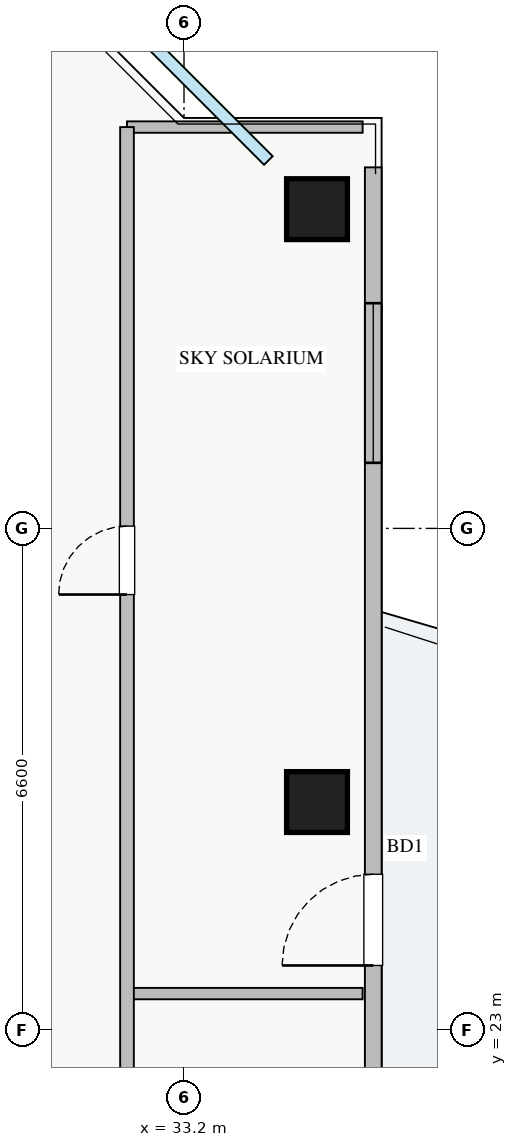
"""IFC4 building model, lengths in metres.
Left out: names, types, materials, properties, quantities, classifications, styles, units other than length and angle.
Written with IfcOpenShell. Run it as: python <this file> out.ifc"""

import sys

from ifc_helpers import new_model, si_unit, direction, frame, frame_2d, origin, origin_2d, place, context, subcontext, project, spatial, rectangle, extrude, source, transform, mapped, element, fill, save


model = new_model("IFC4")
c1 = context("Model", 3, precision=1e-05, world=origin(), true_north=direction((0.0, 1.0)))
c2 = subcontext(c1, "Body", "Model", "MODEL_VIEW")
j1 = project(units=[si_unit("LENGTHUNIT", "METRE"), si_unit("PLANEANGLEUNIT", "RADIAN")], contexts=[c1])
p1 = place(None, origin())
s1 = spatial("IfcSite", under=j1, at=p1, CompositionType="ELEMENT")
p2 = place(p1, origin())
s2 = spatial("IfcBuilding", under=s1, at=p2, CompositionType="ELEMENT")
p3 = place(p2, frame((0.0, 0.0, 197.0)))
s3 = spatial("IfcBuildingStorey", under=s2, at=p3, CompositionType="ELEMENT", Elevation=197.0)
m1 = source(origin(), c2, "Body", "SweptSolid", [
    extrude(rectangle(XDim=0.8, YDim=0.8, at=origin_2d()), origin(), (0.0, 0.0, 1.0), 3.25),
])
for number, where, z_axis, x_axis in (
    (1, (34.95, 26.0, 0.0), (0.0, 0.0, 1.0), (1.0, 0.0, 0.0)),
    (2, (34.95, 33.8, 0.0), (0.0, 0.0, 1.0), (1.0, 0.0, 0.0)),
):
    element("IfcColumn", number, at=place(p3, frame(where, z_axis=z_axis, x_axis=x_axis)), inside=s3, PredefinedType="COLUMN", context=c2, shape_type="MappedRepresentation", body=[
        mapped(m1, transform((0.0, 0.0, 0.0), x_axis=(1.0, 0.0, 0.0), y_axis=(0.0, 1.0, 0.0), z_axis=(0.0, 0.0, 1.0), scale=1.0)),
    ])
p4 = place(p3, frame((35.69, 11.65, 0.0), z_axis=(0.0, 0.0, 1.0), x_axis=(0.0, 1.0, 0.0)))
e3 = element("IfcWall", 3, at=p4, inside=s3, PredefinedType="STANDARD", context=c2, shape_type="SweptSolid", body=[
    extrude(rectangle(XDim=22.7, YDim=0.22, at=frame_2d((11.35, 0.0))), origin(), (0.0, 0.0, 1.0), 2.61),
])
p5 = place(p4, frame((12.2, 0.0, 0.0)))
e4 = element("IfcOpeningElement", 4, at=p5, cuts=e3, PredefinedType="OPENING", context=c2, shape_type="SweptSolid", body=[
    extrude(rectangle(XDim=1.2, YDim=2.1, at=frame_2d((0.6, 1.05))), frame((0.0, 0.12, 0.0), z_axis=(0.0, -1.0, 0.0), x_axis=(1.0, 0.0, 0.0)), (0.0, 0.0, 1.0), 0.24),
])
p6 = place(p4, frame((1.638, 0.0, 0.9)))
e5 = element("IfcOpeningElement", 5, at=p6, cuts=e3, PredefinedType="OPENING", context=c2, shape_type="SweptSolid", body=[
    extrude(rectangle(XDim=2.4, YDim=1.48, at=frame_2d((1.2, 0.74))), frame((0.0, 0.12, 0.0), z_axis=(0.0, -1.0, 0.0), x_axis=(1.0, 0.0, 0.0)), (0.0, 0.0, 1.0), 0.24),
])
p7 = place(p4, frame((18.813, 0.0, 0.9)))
e6 = element("IfcOpeningElement", 6, at=p7, cuts=e3, PredefinedType="OPENING", context=c2, shape_type="SweptSolid", body=[
    extrude(rectangle(XDim=2.1, YDim=1.48, at=frame_2d((1.05, 0.74))), frame((0.0, 0.12, 0.0), z_axis=(0.0, -1.0, 0.0), x_axis=(1.0, 0.0, 0.0)), (0.0, 0.0, 1.0), 0.24),
])
for number, where, z_axis, x_axis in (
    (7, (32.45, 34.88, 0.0), (0.0, 0.0, 1.0), (1.0, 0.0, 0.0)),
    (8, (32.45, 23.48, 0.0), (0.0, 0.0, 1.0), (1.0, 0.0, 0.0)),
):
    element("IfcWall", number, at=place(p3, frame(where, z_axis=z_axis, x_axis=x_axis)), inside=s3, PredefinedType="PARTITIONING", context=c2, shape_type="SweptSolid", body=[
        extrude(rectangle(XDim=3.1, YDim=0.15, at=frame_2d((1.55, 0.0))), origin(), (0.0, 0.0, 1.0), 3.07),
    ])
p8 = place(p3, frame((32.45, 11.12, 0.0), z_axis=(0.0, 0.0, 1.0), x_axis=(0.0, 1.0, 0.0)))
e9 = element("IfcWall", 9, at=p8, inside=s3, PredefinedType="PARTITIONING", context=c2, shape_type="SweptSolid", body=[
    extrude(rectangle(XDim=23.76, YDim=0.18, at=frame_2d((11.88, 0.0))), origin(), (0.0, 0.0, 1.0), 3.07),
])
p9 = place(p8, frame((5.73, 0.0, 0.0)))
e10 = element("IfcOpeningElement", 10, at=p9, cuts=e9, PredefinedType="OPENING", context=c2, shape_type="SweptSolid", body=[
    extrude(rectangle(XDim=0.9, YDim=2.05, at=frame_2d((0.45, 1.025))), frame((0.0, 0.1, 0.0), z_axis=(0.0, -1.0, 0.0), x_axis=(1.0, 0.0, 0.0)), (0.0, 0.0, 1.0), 0.2),
])
p10 = place(p8, frame((17.61, 0.0, 0.0)))
e11 = element("IfcOpeningElement", 11, at=p10, cuts=e9, PredefinedType="OPENING", context=c2, shape_type="SweptSolid", body=[
    extrude(rectangle(XDim=0.9, YDim=2.05, at=frame_2d((0.45, 1.025))), frame((0.0, 0.1, 0.0), z_axis=(0.0, -1.0, 0.0), x_axis=(1.0, 0.0, 0.0)), (0.0, 0.0, 1.0), 0.2),
])
m2 = source(origin(), c2, "Body", "SweptSolid", [
    extrude(rectangle(XDim=1.2, YDim=2.1, at=frame_2d((0.6, 1.05))), frame((0.0, 0.025, 0.0), z_axis=(0.0, -1.0, 0.0), x_axis=(1.0, 0.0, 0.0)), (0.0, 0.0, 1.0), 0.05),
])
p11 = place(p5, origin())
e12 = element("IfcDoor", 12, at=p11, inside=s3, OperationType="SINGLE_SWING_LEFT", PredefinedType="DOOR", context=c2, shape_type="MappedRepresentation", body=[
    mapped(m2, transform((0.0, 0.0, 0.0), x_axis=(1.0, 0.0, 0.0), y_axis=(0.0, 1.0, 0.0), z_axis=(0.0, 0.0, 1.0), scale=1.0)),
])
fill(e4, e12)
m3 = source(origin(), c2, "Body", "SweptSolid", [
    extrude(rectangle(XDim=2.1, YDim=1.48, at=frame_2d((1.05, 0.74))), frame((0.0, 0.03, 0.0), z_axis=(0.0, -1.0, 0.0), x_axis=(1.0, 0.0, 0.0)), (0.0, 0.0, 1.0), 0.06),
])
p12 = place(p7, origin())
e13 = element("IfcWindow", 13, at=p12, inside=s3, PartitioningType="TRIPLE_PANEL_VERTICAL", PredefinedType="WINDOW", context=c2, shape_type="MappedRepresentation", body=[
    mapped(m3, transform((0.0, 0.0, 0.0), x_axis=(1.0, 0.0, 0.0), y_axis=(0.0, 1.0, 0.0), z_axis=(0.0, 0.0, 1.0), scale=1.0)),
])
fill(e6, e13)
m4 = source(origin(), c2, "Body", "SweptSolid", [
    extrude(rectangle(XDim=0.9, YDim=2.05, at=frame_2d((0.45, 1.025))), frame((0.0, 0.025, 0.0), z_axis=(0.0, -1.0, 0.0), x_axis=(1.0, 0.0, 0.0)), (0.0, 0.0, 1.0), 0.05),
])
p13 = place(p10, origin())
e14 = element("IfcDoor", 14, at=p13, inside=s3, OperationType="SINGLE_SWING_LEFT", PredefinedType="DOOR", context=c2, shape_type="MappedRepresentation", body=[
    mapped(m4, transform((0.0, 0.0, 0.0), x_axis=(1.0, 0.0, 0.0), y_axis=(0.0, 1.0, 0.0), z_axis=(0.0, 0.0, 1.0), scale=1.0)),
])
fill(e11, e14)
save(model, sys.argv[1])
